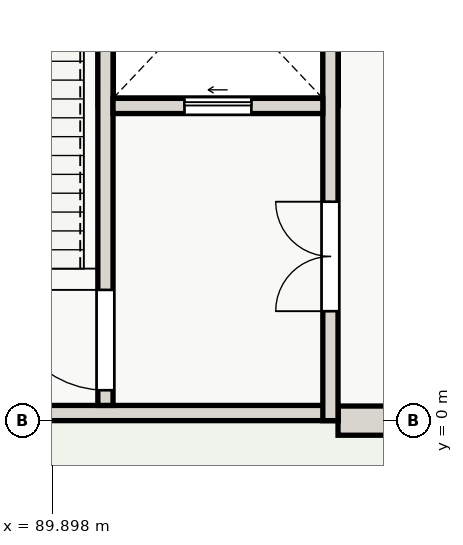
"""IFC4 building model, lengths in metres.
Left out: names, types, materials, properties, quantities, classifications, styles, units other than length and angle.
Written with IfcOpenShell. Run it as: python <this file> out.ifc"""

import sys

from ifc_helpers import new_model, si_unit, direction, frame, frame_2d, origin, place, context, subcontext, project, spatial, rectangle, extrude, element, fill, save


model = new_model("IFC4")
c1 = context("Model", 3, precision=1e-05, world=origin(), true_north=direction((0.0, 1.0)))
c2 = subcontext(c1, "Body", "Model", "MODEL_VIEW")
j1 = project(units=[si_unit("LENGTHUNIT", "METRE"), si_unit("PLANEANGLEUNIT", "RADIAN")], contexts=[c1])
p1 = place(None, origin())
s1 = spatial("IfcSite", under=j1, at=p1, CompositionType="ELEMENT")
p2 = place(p1, origin())
s2 = spatial("IfcBuilding", under=s1, at=p2, CompositionType="ELEMENT")
p3 = place(p2, origin())
s3 = spatial("IfcBuildingStorey", under=s2, at=p3, CompositionType="ELEMENT", Elevation=0.0)
p4 = place(p3, frame((96.0, 0.0, 0.0), z_axis=(0.0, 0.0, 1.0), x_axis=(-1.0, 0.0, 0.0)))
e1 = element("IfcWall", 1, at=p4, inside=s3, PredefinedType="SOLIDWALL", context=c2, shape_type="SweptSolid", body=[
    extrude(rectangle(XDim=1.4, YDim=0.48, at=frame_2d((0.7, 0.0))), origin(), (0.0, 0.0, 1.0), 3.58),
])
p5 = place(p3, frame((90.78, 5.18, -1.6), z_axis=(0.0, 0.0, 1.0), x_axis=(1.0, 0.0, 0.0)))
e2 = element("IfcWall", 2, at=p5, inside=s3, PredefinedType="SHEAR", context=c2, shape_type="SweptSolid", body=[
    extrude(rectangle(XDim=3.7, YDim=0.25, at=frame_2d((1.85, 0.0))), origin(), (0.0, 0.0, 1.0), 1.6),
])
for number, where, z_axis, x_axis in (
    (3, (94.48, 5.18, -1.6), (0.0, 0.0, 1.0), (0.0, 1.0, 0.0)),
    (4, (90.78, 9.08, -1.6), (0.0, 0.0, 1.0), (0.0, -1.0, 0.0)),
):
    element("IfcWall", number, at=place(p3, frame(where, z_axis=z_axis, x_axis=x_axis)), inside=s3, PredefinedType="SHEAR", context=c2, shape_type="SweptSolid", body=[
        extrude(rectangle(XDim=3.9, YDim=0.25, at=frame_2d((1.95, 0.0))), origin(), (0.0, 0.0, 1.0), 1.6),
    ])
p6 = place(p3, frame((94.6, 0.125, 0.0), z_axis=(0.0, 0.0, 1.0), x_axis=(-1.0, 0.0, 0.0)))
e5 = element("IfcWall", 5, at=p6, inside=s3, PredefinedType="SHEAR", context=c2, shape_type="SweptSolid", body=[
    extrude(rectangle(XDim=9.2, YDim=0.25, at=frame_2d((4.6, 0.0))), origin(), (0.0, 0.0, 1.0), 4.2),
])
p7 = place(p6, frame((5.9, 0.0, 0.0)))
e6 = element("IfcOpeningElement", 6, at=p7, cuts=e5, PredefinedType="OPENING", context=c2, shape_type="SweptSolid", body=[
    extrude(rectangle(XDim=1.9, YDim=2.2, at=frame_2d((0.95, 1.1))), frame((0.0, 0.135, 0.0), z_axis=(0.0, -1.0, 0.0), x_axis=(1.0, 0.0, 0.0)), (0.0, 0.0, 1.0), 0.27),
])
p8 = place(p3, frame((94.475, 0.0, 0.0), z_axis=(0.0, 0.0, 1.0), x_axis=(0.0, 1.0, 0.0)))
e7 = element("IfcWall", 7, at=p8, inside=s3, PredefinedType="SHEAR", context=c2, shape_type="SweptSolid", body=[
    extrude(rectangle(XDim=9.2, YDim=0.25, at=frame_2d((4.6, 0.0))), origin(), (0.0, 0.0, 1.0), 4.2),
])
p9 = place(p8, frame((1.8, 0.0, 0.0)))
e8 = element("IfcOpeningElement", 8, at=p9, cuts=e7, PredefinedType="OPENING", context=c2, shape_type="SweptSolid", body=[
    extrude(rectangle(XDim=1.8, YDim=2.15, at=frame_2d((0.9, 1.075))), frame((0.0, 0.135, 0.0), z_axis=(0.0, -1.0, 0.0), x_axis=(1.0, 0.0, 0.0)), (0.0, 0.0, 1.0), 0.27),
])
p10 = place(p3, frame((90.775, 0.25, 0.0), z_axis=(0.0, 0.0, 1.0), x_axis=(0.0, 1.0, 0.0)))
e9 = element("IfcWall", 9, at=p10, inside=s3, PredefinedType="SHEAR", context=c2, shape_type="SweptSolid", body=[
    extrude(rectangle(XDim=8.7, YDim=0.25, at=frame_2d((4.35, 0.0))), origin(), (0.0, 0.0, 1.0), 4.2),
])
p11 = place(p10, frame((0.25, 0.0, 0.0)))
e10 = element("IfcOpeningElement", 10, at=p11, cuts=e9, PredefinedType="OPENING", context=c2, shape_type="SweptSolid", body=[
    extrude(rectangle(XDim=1.65, YDim=2.1, at=frame_2d((0.825, 1.05))), frame((0.0, 0.135, 0.0), z_axis=(0.0, -1.0, 0.0), x_axis=(1.0, 0.0, 0.0)), (0.0, 0.0, 1.0), 0.27),
])
p12 = place(p3, frame((90.9, 5.175, 0.0), z_axis=(0.0, 0.0, 1.0), x_axis=(1.0, 0.0, 0.0)))
e11 = element("IfcWall", 11, at=p12, inside=s3, PredefinedType="SHEAR", context=c2, shape_type="SweptSolid", body=[
    extrude(rectangle(XDim=3.45, YDim=0.25, at=frame_2d((1.725, 0.0))), origin(), (0.0, 0.0, 1.0), 4.2),
])
p13 = place(p12, frame((1.175, 0.0, 0.0)))
e12 = element("IfcOpeningElement", 12, at=p13, cuts=e11, PredefinedType="OPENING", context=c2, shape_type="SweptSolid", body=[
    extrude(rectangle(XDim=1.1, YDim=2.1, at=frame_2d((0.55, 1.05))), frame((0.0, 0.135, 0.0), z_axis=(0.0, -1.0, 0.0), x_axis=(1.0, 0.0, 0.0)), (0.0, 0.0, 1.0), 0.27),
])
p14 = place(p9, origin())
e13 = element("IfcDoor", 13, at=p14, inside=s3, OperationType="DOUBLE_DOOR_SINGLE_SWING", PredefinedType="DOOR", context=c2, shape_type="SweptSolid", body=[
    extrude(rectangle(XDim=1.8, YDim=2.15, at=frame_2d((0.9, 1.075))), frame((0.0, 0.025, 0.0), z_axis=(0.0, -1.0, 0.0), x_axis=(1.0, 0.0, 0.0)), (0.0, 0.0, 1.0), 0.05),
])
fill(e8, e13)
p15 = place(p11, origin())
e14 = element("IfcDoor", 14, at=p15, inside=s3, OperationType="SINGLE_SWING_RIGHT", PredefinedType="DOOR", context=c2, shape_type="SweptSolid", body=[
    extrude(rectangle(XDim=1.65, YDim=2.1, at=frame_2d((0.825, 1.05))), frame((0.0, 0.025, 0.0), z_axis=(0.0, -1.0, 0.0), x_axis=(1.0, 0.0, 0.0)), (0.0, 0.0, 1.0), 0.05),
])
fill(e10, e14)
p16 = place(p13, origin())
e15 = element("IfcDoor", 15, at=p16, inside=s3, OperationType="SLIDING_TO_LEFT", PredefinedType="DOOR", context=c2, shape_type="SweptSolid", body=[
    extrude(rectangle(XDim=1.1, YDim=2.1, at=frame_2d((0.55, 1.05))), frame((0.0, 0.025, 0.0), z_axis=(0.0, -1.0, 0.0), x_axis=(1.0, 0.0, 0.0)), (0.0, 0.0, 1.0), 0.05),
])
fill(e12, e15)
save(model, sys.argv[1])
